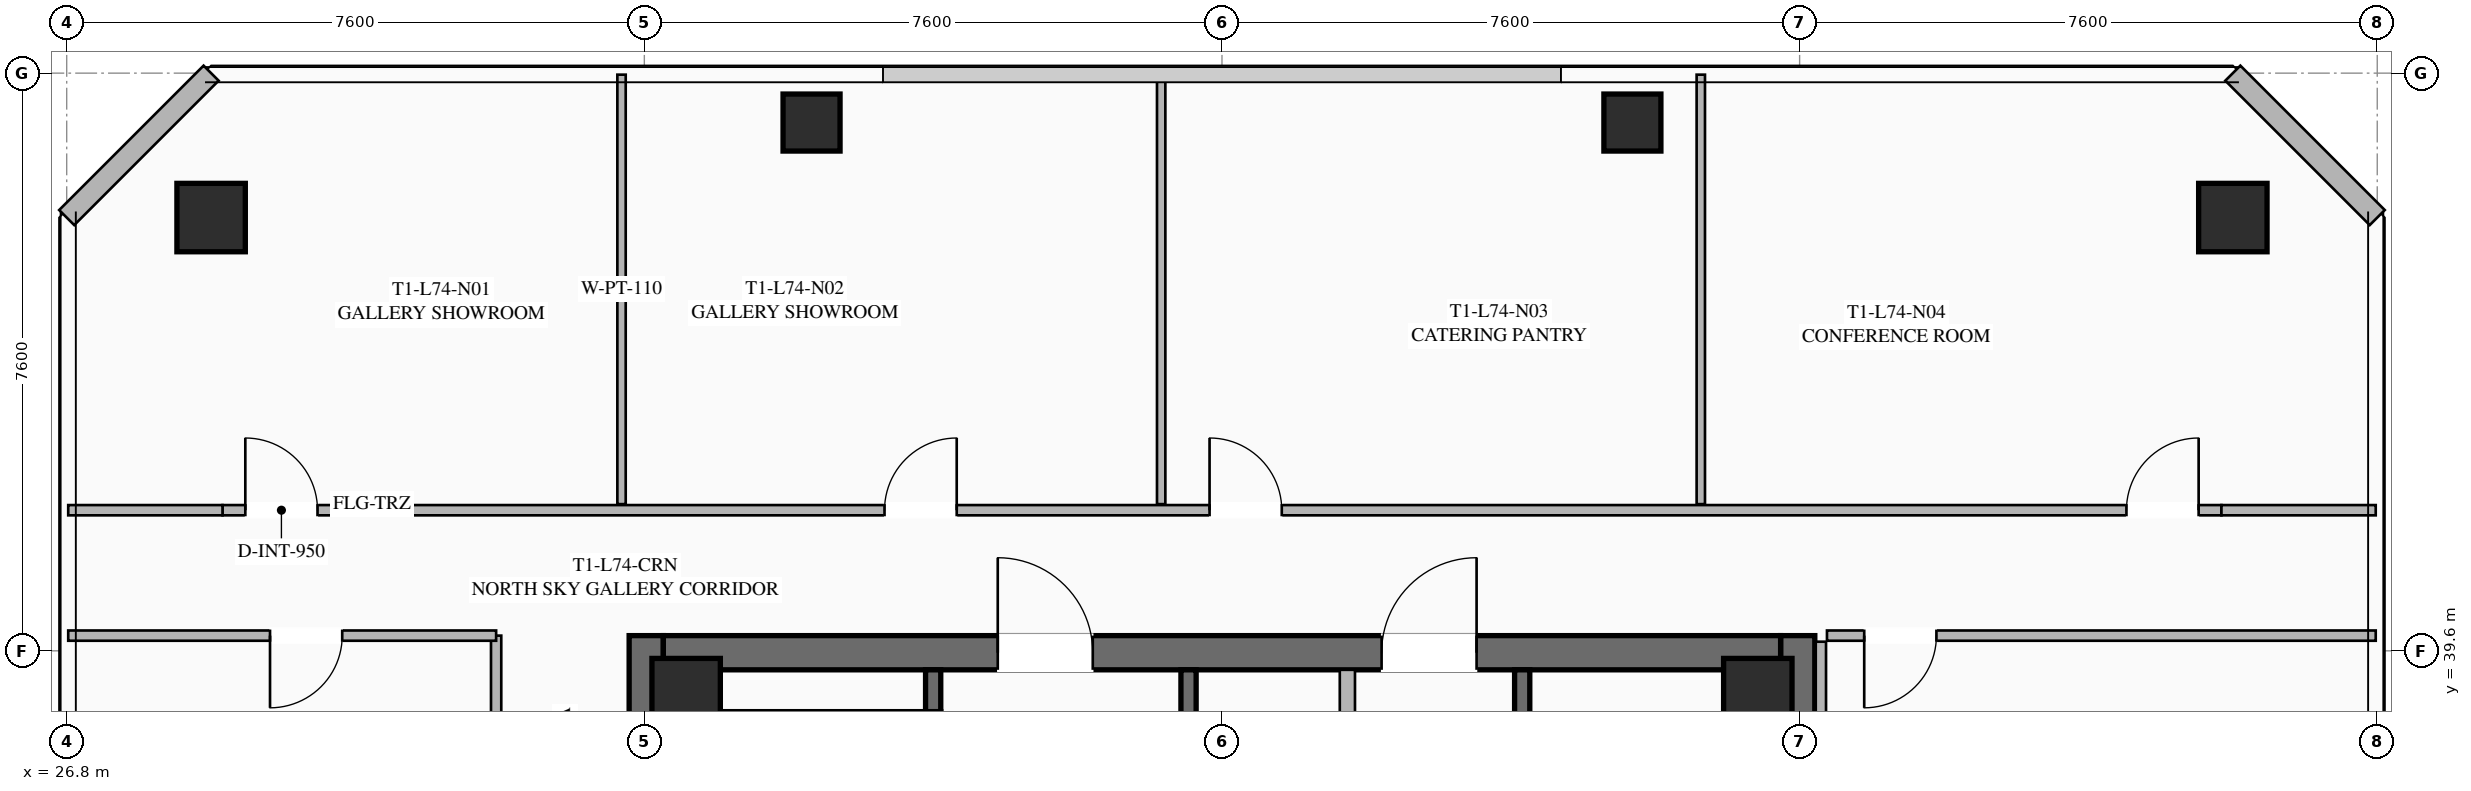
"""IFC4 building model, lengths in metres.
Left out: names, types, materials, properties, quantities, classifications, styles, units other than length and angle.
Written with IfcOpenShell. Run it as: python <this file> out.ifc"""

import sys

from ifc_helpers import new_model, si_unit, direction, frame, frame_2d, origin, origin_2d, place, context, subcontext, project, spatial, rectangle, hollow_rectangle, extrude, element, fill, save


model = new_model("IFC4")
c1 = context("Model", 3, precision=1e-05, world=origin(), true_north=direction((0.0, 1.0)))
c2 = subcontext(c1, "Body", "Model", "MODEL_VIEW")
j1 = project(units=[si_unit("LENGTHUNIT", "METRE"), si_unit("PLANEANGLEUNIT", "RADIAN")], contexts=[c1])
p1 = place(None, origin())
s1 = spatial("IfcSite", under=j1, at=p1, CompositionType="ELEMENT")
p2 = place(p1, origin())
s2 = spatial("IfcBuilding", under=s1, at=p2, CompositionType="ELEMENT")
p3 = place(p2, frame((0.0, 0.0, 274.05)))
s3 = spatial("IfcBuildingStorey", under=s2, at=p3, CompositionType="ELEMENT", Elevation=274.05)
for number, where, z_axis, x_axis in (
    (1, (34.425, 24.2, 0.0), (0.0, 0.0, 1.0), (0.0, 1.0, 0.0)),
    (2, (49.575, 39.8, 0.0), (0.0, 0.0, 1.0), (0.0, -1.0, 0.0)),
):
    element("IfcWall", number, at=place(p3, frame(where, z_axis=z_axis, x_axis=x_axis)), inside=s3, PredefinedType="SHEAR", context=c2, shape_type="SweptSolid", body=[
        extrude(rectangle(XDim=15.6, YDim=0.45, at=frame_2d((7.8, 0.0))), origin(), (0.0, 0.0, 1.0), 3.55),
    ])
p4 = place(p3, frame((34.65, 39.575, 0.0), z_axis=(0.0, 0.0, 1.0), x_axis=(1.0, 0.0, 0.0)))
e3 = element("IfcWall", 3, at=p4, inside=s3, PredefinedType="SHEAR", context=c2, shape_type="SweptSolid", body=[
    extrude(rectangle(XDim=14.7, YDim=0.45, at=frame_2d((7.35, 0.0))), origin(), (0.0, 0.0, 1.0), 3.55),
])
p5 = place(p4, frame((4.4, 0.0, 0.0)))
e4 = element("IfcOpeningElement", 4, at=p5, cuts=e3, PredefinedType="OPENING", context=c2, shape_type="SweptSolid", body=[
    extrude(rectangle(XDim=1.25, YDim=2.25, at=frame_2d((0.625, 1.125))), frame((0.0, 0.235, 0.0), z_axis=(0.0, -1.0, 0.0), x_axis=(1.0, 0.0, 0.0)), (0.0, 0.0, 1.0), 0.47),
])
p6 = place(p4, frame((9.45, 0.0, 0.0)))
e5 = element("IfcOpeningElement", 5, at=p6, cuts=e3, PredefinedType="OPENING", context=c2, shape_type="SweptSolid", body=[
    extrude(rectangle(XDim=1.25, YDim=2.25, at=frame_2d((0.625, 1.125))), frame((0.0, 0.235, 0.0), z_axis=(0.0, -1.0, 0.0), x_axis=(1.0, 0.0, 0.0)), (0.0, 0.0, 1.0), 0.47),
])
for number, where, z_axis, x_axis in (
    (6, (49.05, 39.05, 0.0), (0.0, 0.0, 1.0), (1.0, 0.0, 0.0)),
    (7, (34.95, 39.05, 0.0), (0.0, 0.0, 1.0), (1.0, 0.0, 0.0)),
    (8, (55.3, 45.3, 0.0), (0.0, 0.0, 1.0), (1.0, 0.0, 0.0)),
    (9, (28.7, 45.3, 0.0), (0.0, 0.0, 1.0), (1.0, 0.0, 0.0)),
):
    element("IfcColumn", number, at=place(p3, frame(where, z_axis=z_axis, x_axis=x_axis)), inside=s3, PredefinedType="COLUMN", context=c2, shape_type="SweptSolid", body=[
        extrude(hollow_rectangle(XDim=0.9, YDim=0.9, WallThickness=0.04, at=origin_2d()), origin(), (0.0, 0.0, 1.0), 3.25),
    ])
for number, where, z_axis, x_axis in (
    (10, (47.4, 46.55, 0.0), (0.0, 0.0, 1.0), (1.0, 0.0, 0.0)),
    (11, (36.6, 46.55, 0.0), (0.0, 0.0, 1.0), (1.0, 0.0, 0.0)),
):
    element("IfcColumn", number, at=place(p3, frame(where, z_axis=z_axis, x_axis=x_axis)), inside=s3, PredefinedType="COLUMN", context=c2, shape_type="SweptSolid", body=[
        extrude(hollow_rectangle(XDim=0.75, YDim=0.75, WallThickness=0.032, at=origin_2d()), origin(), (0.0, 0.0, 1.0), 3.25),
    ])
for number, where, z_axis, x_axis in (
    (12, (26.8, 45.3, 0.0), (0.0, 0.0, 1.0), (0.707, 0.707, 0.0)),
    (13, (55.3, 47.2, 0.0), (0.0, 0.0, 1.0), (0.707, -0.707, 0.0)),
):
    element("IfcWall", number, at=place(p3, frame(where, z_axis=z_axis, x_axis=x_axis)), inside=s3, PredefinedType="SOLIDWALL", context=c2, shape_type="SweptSolid", body=[
        extrude(rectangle(XDim=2.687, YDim=0.28, at=frame_2d((1.343, 0.0))), origin(), (0.0, 0.0, 1.0), 3.25),
    ])
p7 = place(p3, frame((38.2, 31.2, 0.0), z_axis=(0.0, 0.0, 1.0), x_axis=(0.0, 1.0, 0.0)))
e14 = element("IfcWall", 14, at=p7, inside=s3, PredefinedType="SHEAR", context=c2, shape_type="SweptSolid", body=[
    extrude(rectangle(XDim=8.15, YDim=0.2, at=frame_2d((4.075, 0.0))), origin(), (0.0, 0.0, 1.0), 3.25),
])
p8 = place(p7, frame((0.45, 0.0, 0.0)))
e15 = element("IfcOpeningElement", 15, at=p8, cuts=e14, PredefinedType="OPENING", context=c2, shape_type="SweptSolid", body=[
    extrude(rectangle(XDim=1.15, YDim=2.2, at=frame_2d((0.575, 1.1))), frame((0.0, 0.11, 0.0), z_axis=(0.0, -1.0, 0.0), x_axis=(1.0, 0.0, 0.0)), (0.0, 0.0, 1.0), 0.22),
])
p9 = place(p3, frame((41.56, 24.65, 0.0), z_axis=(0.0, 0.0, 1.0), x_axis=(0.0, 1.0, 0.0)))
e16 = element("IfcWall", 16, at=p9, inside=s3, PredefinedType="SHEAR", context=c2, shape_type="SweptSolid", body=[
    extrude(rectangle(XDim=14.7, YDim=0.2, at=frame_2d((7.35, 0.0))), origin(), (0.0, 0.0, 1.0), 3.25),
])
p10 = place(p3, frame((45.95, 39.35, 0.0), z_axis=(0.0, 0.0, 1.0), x_axis=(0.0, -1.0, 0.0)))
e17 = element("IfcWall", 17, at=p10, inside=s3, PredefinedType="SHEAR", context=c2, shape_type="SweptSolid", body=[
    extrude(rectangle(XDim=6.55, YDim=0.2, at=frame_2d((3.275, 0.0))), origin(), (0.0, 0.0, 1.0), 3.25),
])
p11 = place(p10, frame((5.075, 0.0, 0.0)))
e18 = element("IfcOpeningElement", 18, at=p11, cuts=e17, PredefinedType="OPENING", context=c2, shape_type="SweptSolid", body=[
    extrude(rectangle(XDim=1.1, YDim=2.2, at=frame_2d((0.55, 1.1))), frame((0.0, 0.11, 0.0), z_axis=(0.0, -1.0, 0.0), x_axis=(1.0, 0.0, 0.0)), (0.0, 0.0, 1.0), 0.22),
])
p12 = place(p10, frame((3.025, 0.0, 0.0)))
e19 = element("IfcOpeningElement", 19, at=p12, cuts=e17, PredefinedType="OPENING", context=c2, shape_type="SweptSolid", body=[
    extrude(rectangle(XDim=1.1, YDim=2.2, at=frame_2d((0.55, 1.1))), frame((0.0, 0.11, 0.0), z_axis=(0.0, -1.0, 0.0), x_axis=(1.0, 0.0, 0.0)), (0.0, 0.0, 1.0), 0.22),
])
p13 = place(p10, frame((1.025, 0.0, 0.0)))
e20 = element("IfcOpeningElement", 20, at=p13, cuts=e17, PredefinedType="OPENING", context=c2, shape_type="SweptSolid", body=[
    extrude(rectangle(XDim=1.1, YDim=2.2, at=frame_2d((0.55, 1.1))), frame((0.0, 0.11, 0.0), z_axis=(0.0, -1.0, 0.0), x_axis=(1.0, 0.0, 0.0)), (0.0, 0.0, 1.0), 0.22),
])
p14 = place(p3, frame((43.65, 32.35, 0.0), z_axis=(0.0, 0.0, 1.0), x_axis=(0.0, 1.0, 0.0)))
e21 = element("IfcWall", 21, at=p14, inside=s3, PredefinedType="SOLIDWALL", context=c2, shape_type="SweptSolid", body=[
    extrude(rectangle(XDim=7.0, YDim=0.2, at=frame_2d((3.5, 0.0))), origin(), (0.0, 0.0, 1.0), 2.603),
])
p15 = place(p14, frame((0.85, 0.0, 0.0)))
e22 = element("IfcOpeningElement", 22, at=p15, cuts=e21, PredefinedType="OPENING", context=c2, shape_type="SweptSolid", body=[
    extrude(rectangle(XDim=0.95, YDim=2.05, at=frame_2d((0.475, 1.025))), frame((0.0, 0.11, 0.0), z_axis=(0.0, -1.0, 0.0), x_axis=(1.0, 0.0, 0.0)), (0.0, 0.0, 1.0), 0.22),
])
p16 = place(p14, frame((4.85, 0.0, 0.0)))
e23 = element("IfcOpeningElement", 23, at=p16, cuts=e21, PredefinedType="OPENING", context=c2, shape_type="SweptSolid", body=[
    extrude(rectangle(XDim=0.95, YDim=2.05, at=frame_2d((0.475, 1.025))), frame((0.0, 0.11, 0.0), z_axis=(0.0, -1.0, 0.0), x_axis=(1.0, 0.0, 0.0)), (0.0, 0.0, 1.0), 0.22),
])
p17 = place(p3, frame((32.45, 35.4, 0.0), z_axis=(0.0, 0.0, 1.0), x_axis=(0.0, 1.0, 0.0)))
e24 = element("IfcWall", 24, at=p17, inside=s3, PredefinedType="PARTITIONING", context=c2, shape_type="SweptSolid", body=[
    extrude(rectangle(XDim=4.4, YDim=0.135, at=frame_2d((2.2, 0.0))), origin(), (0.0, 0.0, 1.0), 2.603),
])
p18 = place(p3, frame((28.85, 41.45, 0.0), z_axis=(0.0, 0.0, 1.0), x_axis=(1.0, 0.0, 0.0)))
e25 = element("IfcWall", 25, at=p18, inside=s3, PredefinedType="PARTITIONING", context=c2, shape_type="SweptSolid", body=[
    extrude(rectangle(XDim=26.3, YDim=0.135, at=frame_2d((13.15, 0.0))), origin(), (0.0, 0.0, 1.0), 2.603),
])
p19 = place(p18, frame((0.3, 0.0, 0.0)))
e26 = element("IfcOpeningElement", 26, at=p19, cuts=e25, PredefinedType="OPENING", context=c2, shape_type="SweptSolid", body=[
    extrude(rectangle(XDim=0.95, YDim=2.05, at=frame_2d((0.475, 1.025))), frame((0.0, 0.077, 0.0), z_axis=(0.0, -1.0, 0.0), x_axis=(1.0, 0.0, 0.0)), (0.0, 0.0, 1.0), 0.155),
])
p20 = place(p18, frame((8.71, 0.0, 0.0)))
e27 = element("IfcOpeningElement", 27, at=p20, cuts=e25, PredefinedType="OPENING", context=c2, shape_type="SweptSolid", body=[
    extrude(rectangle(XDim=0.95, YDim=2.05, at=frame_2d((0.475, 1.025))), frame((0.0, 0.077, 0.0), z_axis=(0.0, -1.0, 0.0), x_axis=(1.0, 0.0, 0.0)), (0.0, 0.0, 1.0), 0.155),
])
p21 = place(p18, frame((12.987, 0.0, 0.0)))
e28 = element("IfcOpeningElement", 28, at=p21, cuts=e25, PredefinedType="OPENING", context=c2, shape_type="SweptSolid", body=[
    extrude(rectangle(XDim=0.95, YDim=2.05, at=frame_2d((0.475, 1.025))), frame((0.0, 0.077, 0.0), z_axis=(0.0, -1.0, 0.0), x_axis=(1.0, 0.0, 0.0)), (0.0, 0.0, 1.0), 0.155),
])
p22 = place(p18, frame((25.05, 0.0, 0.0)))
e29 = element("IfcOpeningElement", 29, at=p22, cuts=e25, PredefinedType="OPENING", context=c2, shape_type="SweptSolid", body=[
    extrude(rectangle(XDim=0.95, YDim=2.05, at=frame_2d((0.475, 1.025))), frame((0.0, 0.077, 0.0), z_axis=(0.0, -1.0, 0.0), x_axis=(1.0, 0.0, 0.0)), (0.0, 0.0, 1.0), 0.155),
])
for number, where, z_axis, x_axis in (
    (30, (26.82, 41.45, 0.0), (0.0, 0.0, 1.0), (1.0, 0.0, 0.0)),
    (31, (55.15, 41.45, 0.0), (0.0, 0.0, 1.0), (1.0, 0.0, 0.0)),
):
    element("IfcWall", number, at=place(p3, frame(where, z_axis=z_axis, x_axis=x_axis)), inside=s3, PredefinedType="PARTITIONING", context=c2, shape_type="SweptSolid", body=[
        extrude(rectangle(XDim=2.03, YDim=0.135, at=frame_2d((1.015, 0.0))), origin(), (0.0, 0.0, 1.0), 2.603),
    ])
for number, where, z_axis, x_axis in (
    (32, (34.1, 41.53, 0.0), (0.0, 0.0, 1.0), (0.0, 1.0, 0.0)),
    (33, (41.2, 41.53, 0.0), (0.0, 0.0, 1.0), (0.0, 1.0, 0.0)),
    (34, (48.3, 41.53, 0.0), (0.0, 0.0, 1.0), (0.0, 1.0, 0.0)),
):
    element("IfcWall", number, at=place(p3, frame(where, z_axis=z_axis, x_axis=x_axis)), inside=s3, PredefinedType="PARTITIONING", context=c2, shape_type="SweptSolid", body=[
        extrude(rectangle(XDim=5.65, YDim=0.11, at=frame_2d((2.825, 0.0))), origin(), (0.0, 0.0, 1.0), 2.603),
    ])
p23 = place(p3, frame((49.88, 39.72, 0.0), z_axis=(0.0, 0.0, 1.0), x_axis=(0.0, -1.0, 0.0)))
e35 = element("IfcWall", 35, at=p23, inside=s3, PredefinedType="PARTITIONING", context=c2, shape_type="SweptSolid", body=[
    extrude(rectangle(XDim=15.44, YDim=0.135, at=frame_2d((7.72, 0.0))), origin(), (0.0, 0.0, 1.0), 2.603),
])
p24 = place(p3, frame((57.18, 39.8, 0.0), z_axis=(0.0, 0.0, 1.0), x_axis=(-1.0, 0.0, 0.0)))
e36 = element("IfcWall", 36, at=p24, inside=s3, PredefinedType="PARTITIONING", context=c2, shape_type="SweptSolid", body=[
    extrude(rectangle(XDim=7.22, YDim=0.135, at=frame_2d((3.61, 0.0))), origin(), (0.0, 0.0, 1.0), 2.603),
])
p25 = place(p24, frame((5.78, 0.0, 0.0)))
e37 = element("IfcOpeningElement", 37, at=p25, cuts=e36, PredefinedType="OPENING", context=c2, shape_type="SweptSolid", body=[
    extrude(rectangle(XDim=0.95, YDim=2.05, at=frame_2d((0.475, 1.025))), frame((0.0, 0.077, 0.0), z_axis=(0.0, -1.0, 0.0), x_axis=(1.0, 0.0, 0.0)), (0.0, 0.0, 1.0), 0.155),
])
p26 = place(p3, frame((32.45, 39.8, 0.0), z_axis=(0.0, 0.0, 1.0), x_axis=(-1.0, 0.0, 0.0)))
e38 = element("IfcWall", 38, at=p26, inside=s3, PredefinedType="PARTITIONING", context=c2, shape_type="SweptSolid", body=[
    extrude(rectangle(XDim=5.63, YDim=0.135, at=frame_2d((2.815, 0.0))), origin(), (0.0, 0.0, 1.0), 2.603),
])
p27 = place(p26, frame((2.025, 0.0, 0.0)))
e39 = element("IfcOpeningElement", 39, at=p27, cuts=e38, PredefinedType="OPENING", context=c2, shape_type="SweptSolid", body=[
    extrude(rectangle(XDim=0.95, YDim=2.05, at=frame_2d((0.475, 1.025))), frame((0.0, 0.077, 0.0), z_axis=(0.0, -1.0, 0.0), x_axis=(1.0, 0.0, 0.0)), (0.0, 0.0, 1.0), 0.155),
])
p28 = place(p5, origin())
e40 = element("IfcDoor", 40, at=p28, inside=s3, OperationType="SINGLE_SWING_LEFT", PredefinedType="DOOR", context=c2, shape_type="SweptSolid", body=[
    extrude(rectangle(XDim=1.25, YDim=2.25, at=frame_2d((0.625, 1.125))), frame((0.0, 0.025, 0.0), z_axis=(0.0, -1.0, 0.0), x_axis=(1.0, 0.0, 0.0)), (0.0, 0.0, 1.0), 0.05),
])
fill(e4, e40)
p29 = place(p6, origin())
e41 = element("IfcDoor", 41, at=p29, inside=s3, OperationType="SINGLE_SWING_RIGHT", PredefinedType="DOOR", context=c2, shape_type="SweptSolid", body=[
    extrude(rectangle(XDim=1.25, YDim=2.25, at=frame_2d((0.625, 1.125))), frame((0.0, 0.025, 0.0), z_axis=(0.0, -1.0, 0.0), x_axis=(1.0, 0.0, 0.0)), (0.0, 0.0, 1.0), 0.05),
])
fill(e5, e41)
p30 = place(p19, origin())
e42 = element("IfcDoor", 42, at=p30, inside=s3, OperationType="SINGLE_SWING_LEFT", PredefinedType="DOOR", context=c2, shape_type="SweptSolid", body=[
    extrude(rectangle(XDim=0.95, YDim=2.05, at=frame_2d((0.475, 1.025))), frame((0.0, 0.025, 0.0), z_axis=(0.0, -1.0, 0.0), x_axis=(1.0, 0.0, 0.0)), (0.0, 0.0, 1.0), 0.05),
])
fill(e26, e42)
p31 = place(p20, origin())
e43 = element("IfcDoor", 43, at=p31, inside=s3, OperationType="SINGLE_SWING_RIGHT", PredefinedType="DOOR", context=c2, shape_type="SweptSolid", body=[
    extrude(rectangle(XDim=0.95, YDim=2.05, at=frame_2d((0.475, 1.025))), frame((0.0, 0.025, 0.0), z_axis=(0.0, -1.0, 0.0), x_axis=(1.0, 0.0, 0.0)), (0.0, 0.0, 1.0), 0.05),
])
fill(e27, e43)
p32 = place(p21, origin())
e44 = element("IfcDoor", 44, at=p32, inside=s3, OperationType="SINGLE_SWING_LEFT", PredefinedType="DOOR", context=c2, shape_type="SweptSolid", body=[
    extrude(rectangle(XDim=0.95, YDim=2.05, at=frame_2d((0.475, 1.025))), frame((0.0, 0.025, 0.0), z_axis=(0.0, -1.0, 0.0), x_axis=(1.0, 0.0, 0.0)), (0.0, 0.0, 1.0), 0.05),
])
fill(e28, e44)
p33 = place(p22, origin())
e45 = element("IfcDoor", 45, at=p33, inside=s3, OperationType="SINGLE_SWING_RIGHT", PredefinedType="DOOR", context=c2, shape_type="SweptSolid", body=[
    extrude(rectangle(XDim=0.95, YDim=2.05, at=frame_2d((0.475, 1.025))), frame((0.0, 0.025, 0.0), z_axis=(0.0, -1.0, 0.0), x_axis=(1.0, 0.0, 0.0)), (0.0, 0.0, 1.0), 0.05),
])
fill(e29, e45)
p34 = place(p25, origin())
e46 = element("IfcDoor", 46, at=p34, inside=s3, OperationType="SINGLE_SWING_RIGHT", PredefinedType="DOOR", context=c2, shape_type="SweptSolid", body=[
    extrude(rectangle(XDim=0.95, YDim=2.05, at=frame_2d((0.475, 1.025))), frame((0.0, 0.025, 0.0), z_axis=(0.0, -1.0, 0.0), x_axis=(1.0, 0.0, 0.0)), (0.0, 0.0, 1.0), 0.05),
])
fill(e37, e46)
p35 = place(p27, origin())
e47 = element("IfcDoor", 47, at=p35, inside=s3, OperationType="SINGLE_SWING_RIGHT", PredefinedType="DOOR", context=c2, shape_type="SweptSolid", body=[
    extrude(rectangle(XDim=0.95, YDim=2.05, at=frame_2d((0.475, 1.025))), frame((0.0, 0.025, 0.0), z_axis=(0.0, -1.0, 0.0), x_axis=(1.0, 0.0, 0.0)), (0.0, 0.0, 1.0), 0.05),
])
fill(e39, e47)
save(model, sys.argv[1])
